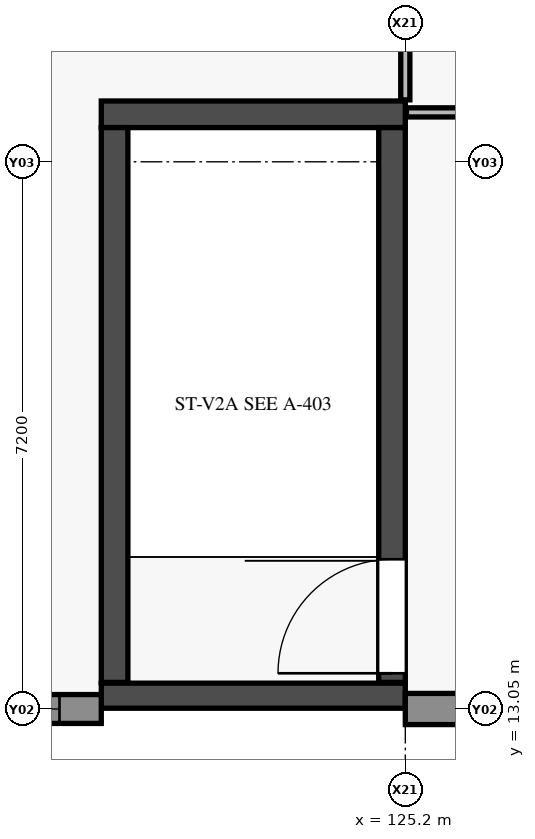
"""IFC4 building model, lengths in metres.
Left out: names, types, materials, properties, quantities, classifications, styles, units other than length and angle.
Written with IfcOpenShell. Run it as: python <this file> out.ifc"""

import sys

from ifc_helpers import new_model, si_unit, direction, frame, frame_2d, origin, place, context, subcontext, project, spatial, rectangle, extrude, element, fill, save


model = new_model("IFC4")
c1 = context("Model", 3, precision=1e-05, world=origin(), true_north=direction((0.0, 1.0)))
c2 = subcontext(c1, "Body", "Model", "MODEL_VIEW")
j1 = project(units=[si_unit("LENGTHUNIT", "METRE"), si_unit("PLANEANGLEUNIT", "RADIAN")], contexts=[c1])
p1 = place(None, origin())
s1 = spatial("IfcSite", under=j1, at=p1, CompositionType="ELEMENT")
p2 = place(p1, origin())
s2 = spatial("IfcBuilding", under=s1, at=p2, CompositionType="ELEMENT")
p3 = place(p2, frame((0.0, 0.0, 4.8)))
s3 = spatial("IfcBuildingStorey", under=s2, at=p3, CompositionType="ELEMENT", Elevation=4.8)
p4 = place(p3, frame((121.2, 13.225, 0.0), z_axis=(0.0, 0.0, 1.0), x_axis=(1.0, 0.0, 0.0)))
e1 = element("IfcWall", 1, at=p4, inside=s3, PredefinedType="SHEAR", context=c2, shape_type="SweptSolid", body=[
    extrude(rectangle(XDim=4.0, YDim=0.33, at=frame_2d((2.0, 0.0))), origin(), (0.0, 0.0, 1.0), 4.2),
])
p5 = place(p3, frame((121.2, 20.875, 0.0), z_axis=(0.0, 0.0, 1.0), x_axis=(1.0, 0.0, 0.0)))
e2 = element("IfcWall", 2, at=p5, inside=s3, PredefinedType="SHEAR", context=c2, shape_type="SweptSolid", body=[
    extrude(rectangle(XDim=4.0, YDim=0.35, at=frame_2d((2.0, 0.0))), origin(), (0.0, 0.0, 1.0), 4.2),
])
p6 = place(p3, frame((121.375, 13.4, 0.0), z_axis=(0.0, 0.0, 1.0), x_axis=(0.0, 1.0, 0.0)))
e3 = element("IfcWall", 3, at=p6, inside=s3, PredefinedType="SHEAR", context=c2, shape_type="SweptSolid", body=[
    extrude(rectangle(XDim=7.3, YDim=0.35, at=frame_2d((3.65, 0.0))), origin(), (0.0, 0.0, 1.0), 4.2),
])
p7 = place(p3, frame((125.025, 13.4, 0.0), z_axis=(0.0, 0.0, 1.0), x_axis=(0.0, 1.0, 0.0)))
e4 = element("IfcWall", 4, at=p7, inside=s3, PredefinedType="SHEAR", context=c2, shape_type="SweptSolid", body=[
    extrude(rectangle(XDim=7.3, YDim=0.35, at=frame_2d((3.65, 0.0))), origin(), (0.0, 0.0, 1.0), 4.2),
])
p8 = place(p7, frame((0.12, 0.0, 0.0)))
e5 = element("IfcOpeningElement", 5, at=p8, cuts=e4, PredefinedType="OPENING", context=c2, shape_type="SweptSolid", body=[
    extrude(rectangle(XDim=1.5, YDim=2.15, at=frame_2d((0.75, 1.075))), frame((0.0, 0.185, 0.0), z_axis=(0.0, -1.0, 0.0), x_axis=(1.0, 0.0, 0.0)), (0.0, 0.0, 1.0), 0.37),
])
p9 = place(p3, frame((132.025, 13.05, 0.0), z_axis=(0.0, 0.0, 1.0), x_axis=(-1.0, 0.0, 0.0)))
e6 = element("IfcWall", 6, at=p9, inside=s3, PredefinedType="USERDEFINED", context=c2, shape_type="SweptSolid", body=[
    extrude(rectangle(XDim=6.825, YDim=0.41, at=frame_2d((3.413, 0.0))), origin(), (0.0, 0.0, 1.0), 3.38),
])
p10 = place(p9, frame((0.877, 0.0, 0.9)))
e7 = element("IfcOpeningElement", 7, at=p10, cuts=e6, PredefinedType="OPENING", context=c2, shape_type="SweptSolid", body=[
    extrude(rectangle(XDim=1.2, YDim=1.5, at=frame_2d((0.6, 0.75))), frame((0.0, 0.215, 0.0), z_axis=(0.0, -1.0, 0.0), x_axis=(1.0, 0.0, 0.0)), (0.0, 0.0, 1.0), 0.43),
])
p11 = place(p9, frame((5.235, 0.0, 0.95)))
e8 = element("IfcOpeningElement", 8, at=p11, cuts=e6, PredefinedType="OPENING", context=c2, shape_type="SweptSolid", body=[
    extrude(rectangle(XDim=0.9, YDim=1.2, at=frame_2d((0.45, 0.6))), frame((0.0, 0.215, 0.0), z_axis=(0.0, -1.0, 0.0), x_axis=(1.0, 0.0, 0.0)), (0.0, 0.0, 1.0), 0.43),
])
p12 = place(p3, frame((121.2, 13.05, 0.0), z_axis=(0.0, 0.0, 1.0), x_axis=(-1.0, 0.0, 0.0)))
e9 = element("IfcWall", 9, at=p12, inside=s3, PredefinedType="USERDEFINED", context=c2, shape_type="SweptSolid", body=[
    extrude(rectangle(XDim=2.9, YDim=0.38, at=frame_2d((1.45, 0.0))), origin(), (0.0, 0.0, 1.0), 3.38),
])
p13 = place(p12, frame((0.55, 0.0, 0.9)))
e10 = element("IfcOpeningElement", 10, at=p13, cuts=e9, PredefinedType="OPENING", context=c2, shape_type="SweptSolid", body=[
    extrude(rectangle(XDim=1.8, YDim=1.5, at=frame_2d((0.9, 0.75))), frame((0.0, 0.2, 0.0), z_axis=(0.0, -1.0, 0.0), x_axis=(1.0, 0.0, 0.0)), (0.0, 0.0, 1.0), 0.4),
])
p14 = place(p3, frame((125.215, 20.9, 0.0), z_axis=(0.0, 0.0, 1.0), x_axis=(1.0, 0.0, 0.0)))
e11 = element("IfcWall", 11, at=p14, inside=s3, PredefinedType="PARTITIONING", context=c2, shape_type="SweptSolid", body=[
    extrude(rectangle(XDim=2.285, YDim=0.12, at=frame_2d((1.143, 0.0))), origin(), (0.0, 0.0, 1.0), 3.95),
])
p15 = place(p3, frame((125.2, 21.065, 0.0), z_axis=(0.0, 0.0, 1.0), x_axis=(0.0, 1.0, 0.0)))
e12 = element("IfcWall", 12, at=p15, inside=s3, PredefinedType="PARTITIONING", context=c2, shape_type="SweptSolid", body=[
    extrude(rectangle(XDim=6.045, YDim=0.12, at=frame_2d((3.022, 0.0))), origin(), (0.0, 0.0, 1.0), 3.95),
])
p16 = place(p13, origin())
e13 = element("IfcWindow", 13, at=p16, inside=s3, PartitioningType="SINGLE_PANEL", PredefinedType="WINDOW", context=c2, shape_type="SweptSolid", body=[
    extrude(rectangle(XDim=1.8, YDim=1.5, at=frame_2d((0.9, 0.75))), frame((0.0, 0.03, 0.0), z_axis=(0.0, -1.0, 0.0), x_axis=(1.0, 0.0, 0.0)), (0.0, 0.0, 1.0), 0.06),
])
fill(e10, e13)
p17 = place(p8, origin())
e14 = element("IfcDoor", 14, at=p17, inside=s3, OperationType="SINGLE_SWING_LEFT", PredefinedType="DOOR", context=c2, shape_type="SweptSolid", body=[
    extrude(rectangle(XDim=1.5, YDim=2.15, at=frame_2d((0.75, 1.075))), frame((0.0, 0.025, 0.0), z_axis=(0.0, -1.0, 0.0), x_axis=(1.0, 0.0, 0.0)), (0.0, 0.0, 1.0), 0.05),
])
fill(e5, e14)
save(model, sys.argv[1])
